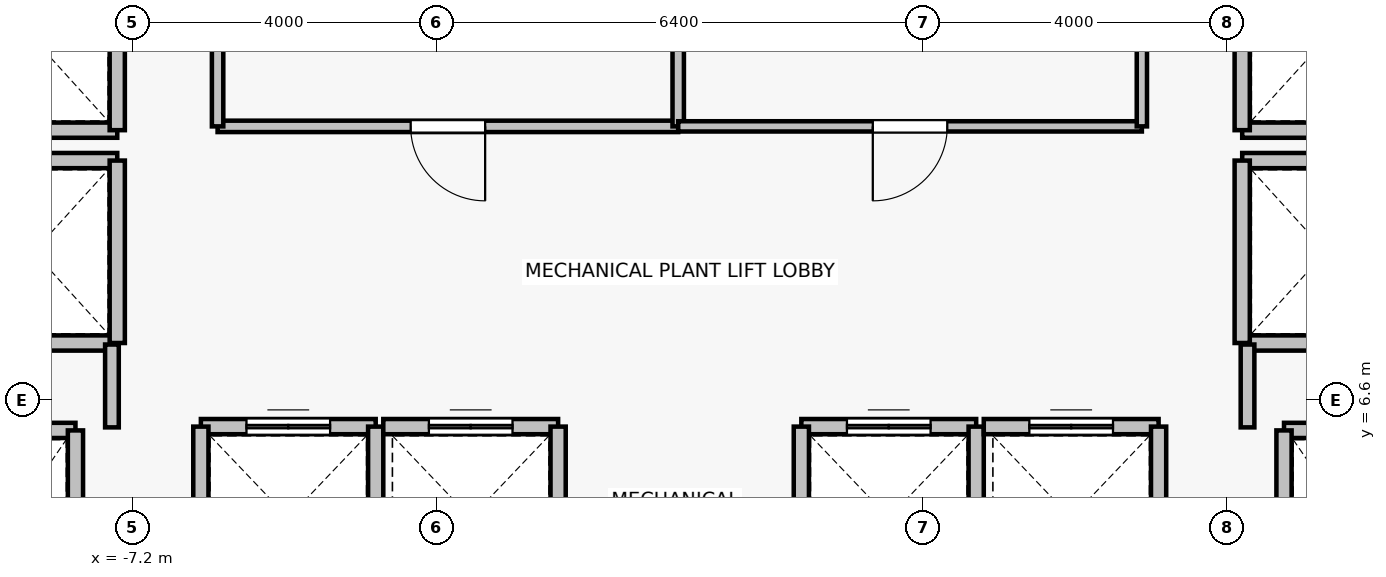
"""IFC4 building model, lengths in metres.
Left out: names, types, materials, properties, quantities, classifications, styles, units other than length and angle.
Written with IfcOpenShell. Run it as: python <this file> out.ifc"""

import sys

from ifc_helpers import new_model, si_unit, direction, frame, frame_2d, origin, place, context, subcontext, project, spatial, rectangle, extrude, source, transform, mapped, element, fill, save


model = new_model("IFC4")
c1 = context("Model", 3, precision=1e-05, world=origin(), true_north=direction((0.0, 1.0)))
c2 = subcontext(c1, "Body", "Model", "MODEL_VIEW")
j1 = project(units=[si_unit("LENGTHUNIT", "METRE"), si_unit("PLANEANGLEUNIT", "RADIAN")], contexts=[c1])
p1 = place(None, origin())
s1 = spatial("IfcSite", under=j1, at=p1, CompositionType="ELEMENT")
p2 = place(p1, origin())
s2 = spatial("IfcBuilding", under=s1, at=p2, CompositionType="ELEMENT")
p3 = place(p2, frame((0.0, 0.0, 139.6)))
s3 = spatial("IfcBuildingStorey", under=s2, at=p3, CompositionType="ELEMENT", Elevation=139.6)
p4 = place(p3, frame((-9.95, 6.2, 0.0), z_axis=(0.0, 0.0, 1.0), x_axis=(1.0, 0.0, 0.0)))
e1 = element("IfcWall", 1, at=p4, inside=s3, PredefinedType="SOLIDWALL", context=c2, shape_type="SweptSolid", body=[
    extrude(rectangle(XDim=2.0, YDim=0.2, at=frame_2d((1.0, 0.0))), origin(), (0.0, 0.0, 1.0), 6.375),
])
p5 = place(p3, frame((-7.95, 6.2, 0.0), z_axis=(0.0, 0.0, 1.0), x_axis=(0.0, -1.0, 0.0)))
e2 = element("IfcWall", 2, at=p5, inside=s3, PredefinedType="SOLIDWALL", context=c2, shape_type="SweptSolid", body=[
    extrude(rectangle(XDim=2.8, YDim=0.2, at=frame_2d((1.4, 0.0))), origin(), (0.0, 0.0, 1.0), 6.375),
])
p6 = place(p3, frame((7.95, 6.2, 0.0), z_axis=(0.0, 0.0, 1.0), x_axis=(1.0, 0.0, 0.0)))
e3 = element("IfcWall", 3, at=p6, inside=s3, PredefinedType="SOLIDWALL", context=c2, shape_type="SweptSolid", body=[
    extrude(rectangle(XDim=2.0, YDim=0.2, at=frame_2d((1.0, 0.0))), origin(), (0.0, 0.0, 1.0), 6.375),
])
p7 = place(p3, frame((7.95, 3.4, 0.0), z_axis=(0.0, 0.0, 1.0), x_axis=(0.0, 1.0, 0.0)))
e4 = element("IfcWall", 4, at=p7, inside=s3, PredefinedType="SOLIDWALL", context=c2, shape_type="SweptSolid", body=[
    extrude(rectangle(XDim=2.8, YDim=0.2, at=frame_2d((1.4, 0.0))), origin(), (0.0, 0.0, 1.0), 6.375),
])
p8 = place(p3, frame((-6.3, 6.25, 0.0), z_axis=(0.0, 0.0, 1.0), x_axis=(1.0, 0.0, 0.0)))
e5 = element("IfcWall", 5, at=p8, inside=s3, PredefinedType="SOLIDWALL", context=c2, shape_type="SweptSolid", body=[
    extrude(rectangle(XDim=2.3, YDim=0.2, at=frame_2d((1.15, 0.0))), origin(), (0.0, 0.0, 1.0), 6.375),
])
p9 = place(p8, frame((0.6, 0.0, 0.0)))
e6 = element("IfcOpeningElement", 6, at=p9, cuts=e5, PredefinedType="OPENING", context=c2, shape_type="SweptSolid", body=[
    extrude(rectangle(XDim=1.1, YDim=2.2, at=frame_2d((0.55, 1.1))), frame((0.0, 0.11, 0.0), z_axis=(0.0, -1.0, 0.0), x_axis=(1.0, 0.0, 0.0)), (0.0, 0.0, 1.0), 0.22),
])
for number, where, z_axis, x_axis in (
    (7, (-6.3, 3.85, 0.0), (0.0, 0.0, 1.0), (0.0, 1.0, 0.0)),
    (8, (-4.0, 6.25, 0.0), (0.0, 0.0, 1.0), (0.0, -1.0, 0.0)),
):
    element("IfcWall", number, at=place(p3, frame(where, z_axis=z_axis, x_axis=x_axis)), inside=s3, PredefinedType="SOLIDWALL", context=c2, shape_type="SweptSolid", body=[
        extrude(rectangle(XDim=2.4, YDim=0.2, at=frame_2d((1.2, 0.0))), origin(), (0.0, 0.0, 1.0), 6.375),
    ])
p10 = place(p3, frame((-3.9, 6.25, 0.0), z_axis=(0.0, 0.0, 1.0), x_axis=(1.0, 0.0, 0.0)))
e9 = element("IfcWall", 9, at=p10, inside=s3, PredefinedType="SOLIDWALL", context=c2, shape_type="SweptSolid", body=[
    extrude(rectangle(XDim=2.3, YDim=0.2, at=frame_2d((1.15, 0.0))), origin(), (0.0, 0.0, 1.0), 6.375),
])
p11 = place(p10, frame((0.6, 0.0, 0.0)))
e10 = element("IfcOpeningElement", 10, at=p11, cuts=e9, PredefinedType="OPENING", context=c2, shape_type="SweptSolid", body=[
    extrude(rectangle(XDim=1.1, YDim=2.2, at=frame_2d((0.55, 1.1))), frame((0.0, 0.11, 0.0), z_axis=(0.0, -1.0, 0.0), x_axis=(1.0, 0.0, 0.0)), (0.0, 0.0, 1.0), 0.22),
])
p12 = place(p3, frame((-1.6, 6.25, 0.0), z_axis=(0.0, 0.0, 1.0), x_axis=(0.0, -1.0, 0.0)))
e11 = element("IfcWall", 11, at=p12, inside=s3, PredefinedType="SOLIDWALL", context=c2, shape_type="SweptSolid", body=[
    extrude(rectangle(XDim=2.4, YDim=0.2, at=frame_2d((1.2, 0.0))), origin(), (0.0, 0.0, 1.0), 6.375),
])
p13 = place(p3, frame((1.6, 6.25, 0.0), z_axis=(0.0, 0.0, 1.0), x_axis=(1.0, 0.0, 0.0)))
e12 = element("IfcWall", 12, at=p13, inside=s3, PredefinedType="SOLIDWALL", context=c2, shape_type="SweptSolid", body=[
    extrude(rectangle(XDim=2.3, YDim=0.2, at=frame_2d((1.15, 0.0))), origin(), (0.0, 0.0, 1.0), 6.375),
])
p14 = place(p13, frame((0.6, 0.0, 0.0)))
e13 = element("IfcOpeningElement", 13, at=p14, cuts=e12, PredefinedType="OPENING", context=c2, shape_type="SweptSolid", body=[
    extrude(rectangle(XDim=1.1, YDim=2.2, at=frame_2d((0.55, 1.1))), frame((0.0, 0.11, 0.0), z_axis=(0.0, -1.0, 0.0), x_axis=(1.0, 0.0, 0.0)), (0.0, 0.0, 1.0), 0.22),
])
for number, where, z_axis, x_axis in (
    (14, (1.6, 3.85, 0.0), (0.0, 0.0, 1.0), (0.0, 1.0, 0.0)),
    (15, (3.9, 6.25, 0.0), (0.0, 0.0, 1.0), (0.0, -1.0, 0.0)),
):
    element("IfcWall", number, at=place(p3, frame(where, z_axis=z_axis, x_axis=x_axis)), inside=s3, PredefinedType="SOLIDWALL", context=c2, shape_type="SweptSolid", body=[
        extrude(rectangle(XDim=2.4, YDim=0.2, at=frame_2d((1.2, 0.0))), origin(), (0.0, 0.0, 1.0), 6.375),
    ])
p15 = place(p3, frame((4.0, 6.25, 0.0), z_axis=(0.0, 0.0, 1.0), x_axis=(1.0, 0.0, 0.0)))
e16 = element("IfcWall", 16, at=p15, inside=s3, PredefinedType="SOLIDWALL", context=c2, shape_type="SweptSolid", body=[
    extrude(rectangle(XDim=2.3, YDim=0.2, at=frame_2d((1.15, 0.0))), origin(), (0.0, 0.0, 1.0), 6.375),
])
p16 = place(p15, frame((0.6, 0.0, 0.0)))
e17 = element("IfcOpeningElement", 17, at=p16, cuts=e16, PredefinedType="OPENING", context=c2, shape_type="SweptSolid", body=[
    extrude(rectangle(XDim=1.1, YDim=2.2, at=frame_2d((0.55, 1.1))), frame((0.0, 0.11, 0.0), z_axis=(0.0, -1.0, 0.0), x_axis=(1.0, 0.0, 0.0)), (0.0, 0.0, 1.0), 0.22),
])
p17 = place(p3, frame((6.3, 6.25, 0.0), z_axis=(0.0, 0.0, 1.0), x_axis=(0.0, -1.0, 0.0)))
e18 = element("IfcWall", 18, at=p17, inside=s3, PredefinedType="SOLIDWALL", context=c2, shape_type="SweptSolid", body=[
    extrude(rectangle(XDim=2.4, YDim=0.2, at=frame_2d((1.2, 0.0))), origin(), (0.0, 0.0, 1.0), 6.375),
])
for number, where, z_axis, x_axis in (
    (19, (-7.4, 7.35, 0.0), (0.0, 0.0, 1.0), (-1.0, 0.0, 0.0)),
    (20, (-9.6, 9.75, 0.0), (0.0, 0.0, 1.0), (1.0, 0.0, 0.0)),
):
    element("IfcWall", number, at=place(p3, frame(where, z_axis=z_axis, x_axis=x_axis)), inside=s3, PredefinedType="SOLIDWALL", context=c2, shape_type="SweptSolid", body=[
        extrude(rectangle(XDim=2.2, YDim=0.2, at=frame_2d((1.1, 0.0))), origin(), (0.0, 0.0, 1.0), 5.865),
    ])
p18 = place(p3, frame((-7.4, 9.75, 0.0), z_axis=(0.0, 0.0, 1.0), x_axis=(0.0, -1.0, 0.0)))
e21 = element("IfcWall", 21, at=p18, inside=s3, PredefinedType="SOLIDWALL", context=c2, shape_type="SweptSolid", body=[
    extrude(rectangle(XDim=2.4, YDim=0.2, at=frame_2d((1.2, 0.0))), origin(), (0.0, 0.0, 1.0), 5.865),
])
p19 = place(p3, frame((-7.4, 10.15, 0.0), z_axis=(0.0, 0.0, 1.0), x_axis=(-1.0, 0.0, 0.0)))
e22 = element("IfcWall", 22, at=p19, inside=s3, PredefinedType="SOLIDWALL", context=c2, shape_type="SweptSolid", body=[
    extrude(rectangle(XDim=2.2, YDim=0.2, at=frame_2d((1.1, 0.0))), origin(), (0.0, 0.0, 1.0), 5.865),
])
p20 = place(p3, frame((-7.4, 12.55, 0.0), z_axis=(0.0, 0.0, 1.0), x_axis=(0.0, -1.0, 0.0)))
e23 = element("IfcWall", 23, at=p20, inside=s3, PredefinedType="SOLIDWALL", context=c2, shape_type="SweptSolid", body=[
    extrude(rectangle(XDim=2.4, YDim=0.2, at=frame_2d((1.2, 0.0))), origin(), (0.0, 0.0, 1.0), 5.865),
])
for number, where, z_axis, x_axis in (
    (24, (9.6, 7.35, 0.0), (0.0, 0.0, 1.0), (-1.0, 0.0, 0.0)),
    (25, (7.4, 9.75, 0.0), (0.0, 0.0, 1.0), (1.0, 0.0, 0.0)),
):
    element("IfcWall", number, at=place(p3, frame(where, z_axis=z_axis, x_axis=x_axis)), inside=s3, PredefinedType="SOLIDWALL", context=c2, shape_type="SweptSolid", body=[
        extrude(rectangle(XDim=2.2, YDim=0.2, at=frame_2d((1.1, 0.0))), origin(), (0.0, 0.0, 1.0), 5.865),
    ])
p21 = place(p3, frame((7.4, 7.35, 0.0), z_axis=(0.0, 0.0, 1.0), x_axis=(0.0, 1.0, 0.0)))
e26 = element("IfcWall", 26, at=p21, inside=s3, PredefinedType="SOLIDWALL", context=c2, shape_type="SweptSolid", body=[
    extrude(rectangle(XDim=2.4, YDim=0.2, at=frame_2d((1.2, 0.0))), origin(), (0.0, 0.0, 1.0), 5.865),
])
p22 = place(p3, frame((9.6, 10.15, 0.0), z_axis=(0.0, 0.0, 1.0), x_axis=(-1.0, 0.0, 0.0)))
e27 = element("IfcWall", 27, at=p22, inside=s3, PredefinedType="SOLIDWALL", context=c2, shape_type="SweptSolid", body=[
    extrude(rectangle(XDim=2.2, YDim=0.2, at=frame_2d((1.1, 0.0))), origin(), (0.0, 0.0, 1.0), 5.865),
])
p23 = place(p3, frame((7.4, 10.15, 0.0), z_axis=(0.0, 0.0, 1.0), x_axis=(0.0, 1.0, 0.0)))
e28 = element("IfcWall", 28, at=p23, inside=s3, PredefinedType="SOLIDWALL", context=c2, shape_type="SweptSolid", body=[
    extrude(rectangle(XDim=2.4, YDim=0.2, at=frame_2d((1.2, 0.0))), origin(), (0.0, 0.0, 1.0), 5.865),
])
for number, where, z_axis, x_axis in (
    (29, (-7.47, 7.33, 0.0), (0.0, 0.0, 1.0), (0.0, -1.0, 0.0)),
    (30, (7.47, 6.24, 0.0), (0.0, 0.0, 1.0), (0.0, 1.0, 0.0)),
):
    element("IfcWall", number, at=place(p3, frame(where, z_axis=z_axis, x_axis=x_axis)), inside=s3, PredefinedType="PARTITIONING", context=c2, shape_type="SweptSolid", body=[
        extrude(rectangle(XDim=1.09, YDim=0.18, at=frame_2d((0.545, 0.0))), origin(), (0.0, 0.0, 1.0), 5.865),
    ])
p24 = place(p3, frame((-0.02, 10.2, 0.0), z_axis=(0.0, 0.0, 1.0), x_axis=(-1.0, 0.0, 0.0)))
e31 = element("IfcWall", 31, at=p24, inside=s3, PredefinedType="PARTITIONING", context=c2, shape_type="SweptSolid", body=[
    extrude(rectangle(XDim=6.06, YDim=0.15, at=frame_2d((3.03, 0.0))), origin(), (0.0, 0.0, 1.0), 6.375),
])
p25 = place(p24, frame((2.54, 0.0, 0.0)))
e32 = element("IfcOpeningElement", 32, at=p25, cuts=e31, PredefinedType="OPENING", context=c2, shape_type="SweptSolid", body=[
    extrude(rectangle(XDim=0.98, YDim=2.15, at=frame_2d((0.49, 1.075))), frame((0.0, 0.085, 0.0), z_axis=(0.0, -1.0, 0.0), x_axis=(1.0, 0.0, 0.0)), (0.0, 0.0, 1.0), 0.17),
])
for number, where, z_axis, x_axis in (
    (33, (-6.08, 10.2, 0.0), (0.0, 0.0, 1.0), (0.0, 1.0, 0.0)),
    (34, (-0.02, 13.0, 0.0), (0.0, 0.0, 1.0), (0.0, -1.0, 0.0)),
):
    element("IfcWall", number, at=place(p3, frame(where, z_axis=z_axis, x_axis=x_axis)), inside=s3, PredefinedType="PARTITIONING", context=c2, shape_type="SweptSolid", body=[
        extrude(rectangle(XDim=2.8, YDim=0.15, at=frame_2d((1.4, 0.0))), origin(), (0.0, 0.0, 1.0), 6.375),
    ])
p26 = place(p3, frame((6.08, 10.2, 0.0), z_axis=(0.0, 0.0, 1.0), x_axis=(-1.0, 0.0, 0.0)))
e35 = element("IfcWall", 35, at=p26, inside=s3, PredefinedType="PARTITIONING", context=c2, shape_type="SweptSolid", body=[
    extrude(rectangle(XDim=6.1, YDim=0.135, at=frame_2d((3.05, 0.0))), origin(), (0.0, 0.0, 1.0), 6.375),
])
p27 = place(p26, frame((2.56, 0.0, 0.0)))
e36 = element("IfcOpeningElement", 36, at=p27, cuts=e35, PredefinedType="OPENING", context=c2, shape_type="SweptSolid", body=[
    extrude(rectangle(XDim=0.98, YDim=2.15, at=frame_2d((0.49, 1.075))), frame((0.0, 0.077, 0.0), z_axis=(0.0, -1.0, 0.0), x_axis=(1.0, 0.0, 0.0)), (0.0, 0.0, 1.0), 0.155),
])
p28 = place(p3, frame((6.08, 13.0, 0.0), z_axis=(0.0, 0.0, 1.0), x_axis=(0.0, -1.0, 0.0)))
e37 = element("IfcWall", 37, at=p28, inside=s3, PredefinedType="PARTITIONING", context=c2, shape_type="SweptSolid", body=[
    extrude(rectangle(XDim=2.8, YDim=0.135, at=frame_2d((1.4, 0.0))), origin(), (0.0, 0.0, 1.0), 6.375),
])
m1 = source(origin(), c2, "Body", "SweptSolid", [
    extrude(rectangle(XDim=1.1, YDim=2.2, at=frame_2d((0.55, 1.1))), frame((0.0, 0.025, 0.0), z_axis=(0.0, -1.0, 0.0), x_axis=(1.0, 0.0, 0.0)), (0.0, 0.0, 1.0), 0.05),
])
p29 = place(p9, origin())
e38 = element("IfcDoor", 38, at=p29, inside=s3, OperationType="DOUBLE_DOOR_SLIDING", PredefinedType="DOOR", context=c2, shape_type="MappedRepresentation", body=[
    mapped(m1, transform((0.0, 0.0, 0.0), x_axis=(1.0, 0.0, 0.0), y_axis=(0.0, 1.0, 0.0), z_axis=(0.0, 0.0, 1.0), scale=1.0)),
])
fill(e6, e38)
p30 = place(p11, origin())
e39 = element("IfcDoor", 39, at=p30, inside=s3, OperationType="DOUBLE_DOOR_SLIDING", PredefinedType="DOOR", context=c2, shape_type="MappedRepresentation", body=[
    mapped(m1, transform((0.0, 0.0, 0.0), x_axis=(1.0, 0.0, 0.0), y_axis=(0.0, 1.0, 0.0), z_axis=(0.0, 0.0, 1.0), scale=1.0)),
])
fill(e10, e39)
p31 = place(p14, origin())
e40 = element("IfcDoor", 40, at=p31, inside=s3, OperationType="DOUBLE_DOOR_SLIDING", PredefinedType="DOOR", context=c2, shape_type="MappedRepresentation", body=[
    mapped(m1, transform((0.0, 0.0, 0.0), x_axis=(1.0, 0.0, 0.0), y_axis=(0.0, 1.0, 0.0), z_axis=(0.0, 0.0, 1.0), scale=1.0)),
])
fill(e13, e40)
p32 = place(p16, origin())
e41 = element("IfcDoor", 41, at=p32, inside=s3, OperationType="DOUBLE_DOOR_SLIDING", PredefinedType="DOOR", context=c2, shape_type="MappedRepresentation", body=[
    mapped(m1, transform((0.0, 0.0, 0.0), x_axis=(1.0, 0.0, 0.0), y_axis=(0.0, 1.0, 0.0), z_axis=(0.0, 0.0, 1.0), scale=1.0)),
])
fill(e17, e41)
m2 = source(origin(), c2, "Body", "SweptSolid", [
    extrude(rectangle(XDim=0.98, YDim=2.15, at=frame_2d((0.49, 1.075))), frame((0.0, 0.025, 0.0), z_axis=(0.0, -1.0, 0.0), x_axis=(1.0, 0.0, 0.0)), (0.0, 0.0, 1.0), 0.05),
])
p33 = place(p25, origin())
e42 = element("IfcDoor", 42, at=p33, inside=s3, OperationType="SINGLE_SWING_LEFT", PredefinedType="DOOR", context=c2, shape_type="MappedRepresentation", body=[
    mapped(m2, transform((0.0, 0.0, 0.0), x_axis=(1.0, 0.0, 0.0), y_axis=(0.0, 1.0, 0.0), z_axis=(0.0, 0.0, 1.0), scale=1.0)),
])
fill(e32, e42)
p34 = place(p27, origin())
e43 = element("IfcDoor", 43, at=p34, inside=s3, OperationType="SINGLE_SWING_RIGHT", PredefinedType="DOOR", context=c2, shape_type="MappedRepresentation", body=[
    mapped(m2, transform((0.0, 0.0, 0.0), x_axis=(1.0, 0.0, 0.0), y_axis=(0.0, 1.0, 0.0), z_axis=(0.0, 0.0, 1.0), scale=1.0)),
])
fill(e36, e43)
save(model, sys.argv[1])
